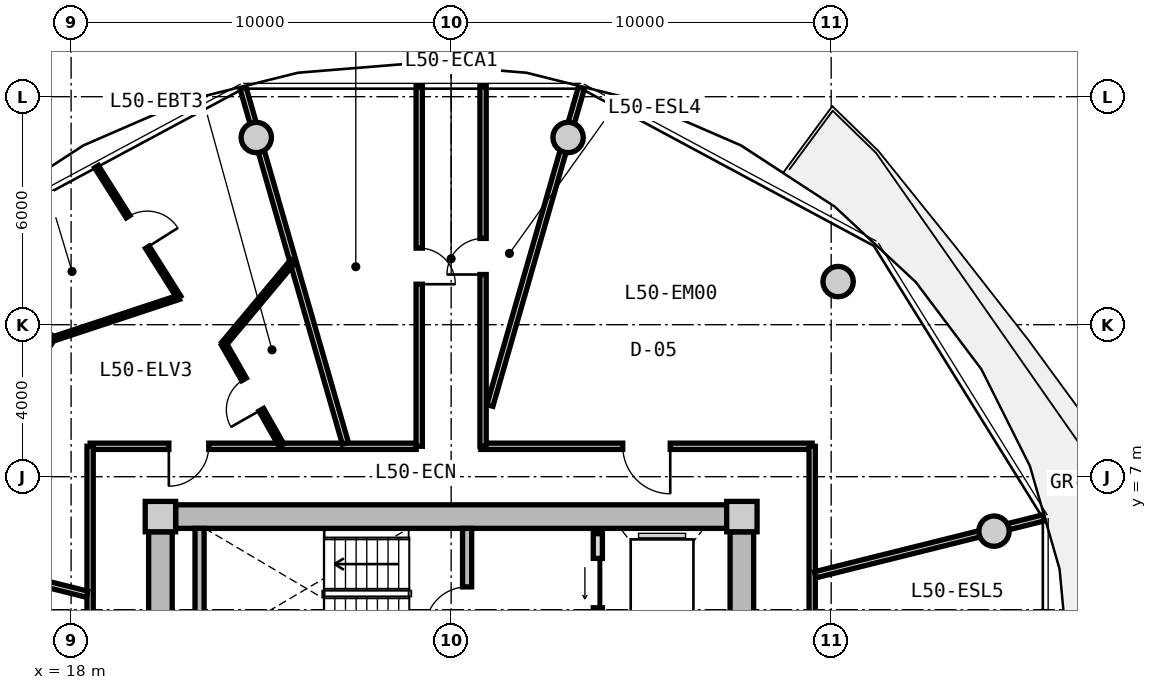
"""IFC4 building model, lengths in metres.
Left out: names, types, materials, properties, quantities, classifications, styles, units other than length and angle.
Written with IfcOpenShell. Run it as: python <this file> out.ifc"""

import sys

from ifc_helpers import new_model, si_unit, direction, frame, frame_2d, origin, origin_2d, place, context, subcontext, project, spatial, rectangle, circle, extrude, source, transform, mapped, element, fill, save


model = new_model("IFC4")
c1 = context("Model", 3, precision=1e-05, world=origin(), true_north=direction((0.0, 1.0)))
c2 = subcontext(c1, "Body", "Model", "MODEL_VIEW")
j1 = project(units=[si_unit("LENGTHUNIT", "METRE"), si_unit("PLANEANGLEUNIT", "RADIAN")], contexts=[c1])
p1 = place(None, origin())
s1 = spatial("IfcSite", under=j1, at=p1, CompositionType="ELEMENT")
p2 = place(p1, origin())
s2 = spatial("IfcBuilding", under=s1, at=p2, CompositionType="ELEMENT")
p3 = place(p2, frame((0.0, 0.0, 161.75)))
s3 = spatial("IfcBuildingStorey", under=s2, at=p3, CompositionType="ELEMENT", Elevation=161.75)
m1 = source(origin(), c2, "Body", "SweptSolid", [
    extrude(rectangle(XDim=0.8, YDim=0.8, at=origin_2d()), origin(), (0.0, 0.0, 1.0), 3.05),
])
for number, where, z_axis, x_axis in (
    (1, (35.65, 5.95, 0.0), (0.0, 0.0, 1.0), (1.0, 0.0, 0.0)),
    (2, (20.35, 5.95, 0.0), (0.0, 0.0, 1.0), (1.0, 0.0, 0.0)),
):
    element("IfcColumn", number, at=place(p3, frame(where, z_axis=z_axis, x_axis=x_axis)), inside=s3, PredefinedType="COLUMN", context=c2, shape_type="MappedRepresentation", body=[
        mapped(m1, transform((0.0, 0.0, 0.0), x_axis=(1.0, 0.0, 0.0), y_axis=(0.0, 1.0, 0.0), z_axis=(0.0, 0.0, 1.0), scale=1.0)),
    ])
m2 = source(origin(), c2, "Body", "SweptSolid", [
    extrude(rectangle(XDim=14.5, YDim=0.62, at=frame_2d((7.25, 0.0))), origin(), (0.0, 0.0, 1.0), 2.81),
])
p4 = place(p3, frame((20.75, 5.95, 0.0), z_axis=(0.0, 0.0, 1.0), x_axis=(1.0, 0.0, 0.0)))
e3 = element("IfcWall", 3, at=p4, inside=s3, PredefinedType="SHEAR", context=c2, shape_type="MappedRepresentation", body=[
    mapped(m2, transform((0.0, 0.0, 0.0), x_axis=(1.0, 0.0, 0.0), y_axis=(0.0, 1.0, 0.0), z_axis=(0.0, 0.0, 1.0), scale=1.0)),
])
m3 = source(origin(), c2, "Body", "SweptSolid", [
    extrude(rectangle(XDim=11.1, YDim=0.62, at=frame_2d((5.55, 0.0))), origin(), (0.0, 0.0, 1.0), 2.81),
])
p5 = place(p3, frame((20.35, -5.55, 0.0), z_axis=(0.0, 0.0, 1.0), x_axis=(0.0, 1.0, 0.0)))
e4 = element("IfcWall", 4, at=p5, inside=s3, PredefinedType="SHEAR", context=c2, shape_type="MappedRepresentation", body=[
    mapped(m3, transform((0.0, 0.0, 0.0), x_axis=(1.0, 0.0, 0.0), y_axis=(0.0, 1.0, 0.0), z_axis=(0.0, 0.0, 1.0), scale=1.0)),
])
p6 = place(p5, frame((3.8, 0.0, 0.0)))
e5 = element("IfcOpeningElement", 5, at=p6, cuts=e4, PredefinedType="OPENING", context=c2, shape_type="SweptSolid", body=[
    extrude(rectangle(XDim=1.2, YDim=2.15, at=frame_2d((0.6, 1.075))), frame((0.0, 0.32, 0.0), z_axis=(0.0, -1.0, 0.0), x_axis=(1.0, 0.0, 0.0)), (0.0, 0.0, 1.0), 0.64),
])
p7 = place(p3, frame((35.65, 5.55, 0.0), z_axis=(0.0, 0.0, 1.0), x_axis=(0.0, -1.0, 0.0)))
e6 = element("IfcWall", 6, at=p7, inside=s3, PredefinedType="SHEAR", context=c2, shape_type="MappedRepresentation", body=[
    mapped(m3, transform((0.0, 0.0, 0.0), x_axis=(1.0, 0.0, 0.0), y_axis=(0.0, 1.0, 0.0), z_axis=(0.0, 0.0, 1.0), scale=1.0)),
])
p8 = place(p7, frame((5.65, 0.0, 0.0)))
e7 = element("IfcOpeningElement", 7, at=p8, cuts=e6, PredefinedType="OPENING", context=c2, shape_type="SweptSolid", body=[
    extrude(rectangle(XDim=1.2, YDim=2.15, at=frame_2d((0.6, 1.075))), frame((0.0, 0.32, 0.0), z_axis=(0.0, -1.0, 0.0), x_axis=(1.0, 0.0, 0.0)), (0.0, 0.0, 1.0), 0.64),
])
m4 = source(origin(), c2, "Body", "SweptSolid", [
    extrude(circle(Radius=0.4, at=origin_2d()), origin(), (0.0, 0.0, 1.0), 3.05),
])
for number, where, z_axis, x_axis in (
    (8, (42.285, 5.567, 0.0), (0.0, 0.0, 1.0), (1.0, 0.0, 0.0)),
    (9, (38.183, 12.135, 0.0), (0.0, 0.0, 1.0), (1.0, 0.0, 0.0)),
    (10, (31.077, 15.926, 0.0), (0.0, 0.0, 1.0), (1.0, 0.0, 0.0)),
    (11, (22.873, 15.926, 0.0), (0.0, 0.0, 1.0), (1.0, 0.0, 0.0)),
):
    element("IfcColumn", number, at=place(p3, frame(where, z_axis=z_axis, x_axis=x_axis)), inside=s3, PredefinedType="COLUMN", context=c2, shape_type="MappedRepresentation", body=[
        mapped(m4, transform((0.0, 0.0, 0.0), x_axis=(1.0, 0.0, 0.0), y_axis=(0.0, 1.0, 0.0), z_axis=(0.0, 0.0, 1.0), scale=1.0)),
    ])
m5 = source(origin(), c2, "Body", "SweptSolid", [
    extrude(rectangle(XDim=3.19, YDim=0.24, at=frame_2d((1.595, 0.0))), origin(), (0.0, 0.0, 1.0), 2.81),
])
p9 = place(p3, frame((21.38, 2.45, 0.0), z_axis=(0.0, 0.0, 1.0), x_axis=(0.0, 1.0, 0.0)))
e12 = element("IfcWall", 12, at=p9, inside=s3, PredefinedType="PARTITIONING", context=c2, shape_type="MappedRepresentation", body=[
    mapped(m5, transform((0.0, 0.0, 0.0), x_axis=(1.0, 0.0, 0.0), y_axis=(0.0, 1.0, 0.0), z_axis=(0.0, 0.0, 1.0), scale=1.0)),
])
p10 = place(p3, frame((28.42, 2.45, 0.0), z_axis=(0.0, 0.0, 1.0), x_axis=(0.0, 1.0, 0.0)))
e13 = element("IfcWall", 13, at=p10, inside=s3, PredefinedType="PARTITIONING", context=c2, shape_type="MappedRepresentation", body=[
    mapped(m5, transform((0.0, 0.0, 0.0), x_axis=(1.0, 0.0, 0.0), y_axis=(0.0, 1.0, 0.0), z_axis=(0.0, 0.0, 1.0), scale=1.0)),
])
p11 = place(p10, frame((0.55, 0.0, 0.0)))
e14 = element("IfcOpeningElement", 14, at=p11, cuts=e13, PredefinedType="OPENING", context=c2, shape_type="SweptSolid", body=[
    extrude(rectangle(XDim=1.1, YDim=2.15, at=frame_2d((0.55, 1.075))), frame((0.0, 0.13, 0.0), z_axis=(0.0, -1.0, 0.0), x_axis=(1.0, 0.0, 0.0)), (0.0, 0.0, 1.0), 0.26),
])
m6 = source(origin(), c2, "Body", "SweptSolid", [
    extrude(rectangle(XDim=5.0, YDim=0.24, at=frame_2d((2.5, 0.0))), origin(), (0.0, 0.0, 1.0), 2.795),
])
p12 = place(p3, frame((31.86, 0.5, 0.0), z_axis=(0.0, 0.0, 1.0), x_axis=(0.0, 1.0, 0.0)))
e15 = element("IfcWall", 15, at=p12, inside=s3, PredefinedType="PARTITIONING", context=c2, shape_type="MappedRepresentation", body=[
    mapped(m6, transform((0.0, 0.0, 0.0), x_axis=(1.0, 0.0, 0.0), y_axis=(0.0, 1.0, 0.0), z_axis=(0.0, 0.0, 1.0), scale=1.0)),
])
p13 = place(p12, frame((3.05, 0.0, 0.0)))
e16 = element("IfcOpeningElement", 16, at=p13, cuts=e15, PredefinedType="OPENING", context=c2, shape_type="SweptSolid", body=[
    extrude(rectangle(XDim=1.3, YDim=2.2, at=frame_2d((0.65, 1.1))), frame((0.0, 0.13, 0.0), z_axis=(0.0, -1.0, 0.0), x_axis=(1.0, 0.0, 0.0)), (0.0, 0.0, 1.0), 0.26),
])
p14 = place(p12, frame((0.55, 0.0, 0.0)))
e17 = element("IfcOpeningElement", 17, at=p14, cuts=e15, PredefinedType="OPENING", context=c2, shape_type="SweptSolid", body=[
    extrude(rectangle(XDim=1.3, YDim=2.2, at=frame_2d((0.65, 1.1))), frame((0.0, 0.13, 0.0), z_axis=(0.0, -1.0, 0.0), x_axis=(1.0, 0.0, 0.0)), (0.0, 0.0, 1.0), 0.26),
])
m7 = source(origin(), c2, "Body", "SweptSolid", [
    extrude(rectangle(XDim=8.58, YDim=0.165, at=frame_2d((4.29, 0.0))), origin(), (0.0, 0.0, 1.0), 2.795),
])
p15 = place(p3, frame((18.5, 7.8, 0.0), z_axis=(0.0, 0.0, 1.0), x_axis=(1.0, 0.0, 0.0)))
e18 = element("IfcWall", 18, at=p15, inside=s3, PredefinedType="PARTITIONING", context=c2, shape_type="MappedRepresentation", body=[
    mapped(m7, transform((0.0, 0.0, 0.0), x_axis=(1.0, 0.0, 0.0), y_axis=(0.0, 1.0, 0.0), z_axis=(0.0, 0.0, 1.0), scale=1.0)),
])
p16 = place(p15, frame((2.072, 0.0, 0.0)))
e19 = element("IfcOpeningElement", 19, at=p16, cuts=e18, PredefinedType="OPENING", context=c2, shape_type="SweptSolid", body=[
    extrude(rectangle(XDim=1.05, YDim=2.15, at=frame_2d((0.525, 1.075))), frame((0.0, 0.093, 0.0), z_axis=(0.0, -1.0, 0.0), x_axis=(1.0, 0.0, 0.0)), (0.0, 0.0, 1.0), 0.185),
])
m8 = source(origin(), c2, "Body", "SweptSolid", [
    extrude(rectangle(XDim=8.719, YDim=0.165, at=frame_2d((4.36, 0.0))), origin(), (0.0, 0.0, 1.0), 2.795),
])
p17 = place(p3, frame((28.781, 7.8, 0.0), z_axis=(0.0, 0.0, 1.0), x_axis=(1.0, 0.0, 0.0)))
e20 = element("IfcWall", 20, at=p17, inside=s3, PredefinedType="PARTITIONING", context=c2, shape_type="MappedRepresentation", body=[
    mapped(m8, transform((0.0, 0.0, 0.0), x_axis=(1.0, 0.0, 0.0), y_axis=(0.0, 1.0, 0.0), z_axis=(0.0, 0.0, 1.0), scale=1.0)),
])
p18 = place(p17, frame((3.735, 0.0, 0.0)))
e21 = element("IfcOpeningElement", 21, at=p18, cuts=e20, PredefinedType="OPENING", context=c2, shape_type="SweptSolid", body=[
    extrude(rectangle(XDim=1.25, YDim=2.2, at=frame_2d((0.625, 1.1))), frame((0.0, 0.093, 0.0), z_axis=(0.0, -1.0, 0.0), x_axis=(1.0, 0.0, 0.0)), (0.0, 0.0, 1.0), 0.185),
])
m9 = source(origin(), c2, "Body", "SweptSolid", [
    extrude(rectangle(XDim=6.88, YDim=0.165, at=frame_2d((3.44, 0.0))), origin(), (0.0, 0.0, 1.0), 2.795),
])
for number, where, z_axis, x_axis in (
    (22, (18.5, 0.92, 0.0), (0.0, 0.0, 1.0), (0.0, 1.0, 0.0)),
    (23, (37.5, 7.8, 0.0), (0.0, 0.0, 1.0), (0.0, -1.0, 0.0)),
):
    element("IfcWall", number, at=place(p3, frame(where, z_axis=z_axis, x_axis=x_axis)), inside=s3, PredefinedType="PARTITIONING", context=c2, shape_type="MappedRepresentation", body=[
        mapped(m9, transform((0.0, 0.0, 0.0), x_axis=(1.0, 0.0, 0.0), y_axis=(0.0, 1.0, 0.0), z_axis=(0.0, 0.0, 1.0), scale=1.0)),
    ])
m10 = source(origin(), c2, "Body", "SweptSolid", [
    extrude(rectangle(XDim=8.695, YDim=0.165, at=frame_2d((4.348, 0.0))), origin(), (0.0, 0.0, 1.0), 2.345),
])
p19 = place(p3, frame((29.02, 8.875, 0.0), z_axis=(0.0, 0.0, 1.0), x_axis=(0.276797231892, 0.960928349263, 0.0)))
e24 = element("IfcWall", 24, at=p19, inside=s3, PredefinedType="PARTITIONING", context=c2, shape_type="MappedRepresentation", body=[
    mapped(m10, transform((0.0, 0.0, 0.0), x_axis=(1.0, 0.0, 0.0), y_axis=(0.0, 1.0, 0.0), z_axis=(0.0, 0.0, 1.0), scale=1.0)),
])
m11 = source(origin(), c2, "Body", "SweptSolid", [
    extrude(rectangle(XDim=9.73, YDim=0.165, at=frame_2d((4.865, 0.0))), origin(), (0.0, 0.0, 1.0), 2.345),
])
p20 = place(p3, frame((25.217, 7.88, 0.0), z_axis=(0.0, 0.0, 1.0), x_axis=(-0.27679492614, 0.960929013436, 0.0)))
e25 = element("IfcWall", 25, at=p20, inside=s3, PredefinedType="PARTITIONING", context=c2, shape_type="MappedRepresentation", body=[
    mapped(m11, transform((0.0, 0.0, 0.0), x_axis=(1.0, 0.0, 0.0), y_axis=(0.0, 1.0, 0.0), z_axis=(0.0, 0.0, 1.0), scale=1.0)),
])
m12 = source(origin(), c2, "Body", "SweptSolid", [
    extrude(rectangle(XDim=8.305, YDim=0.165, at=frame_2d((4.153, 0.0))), origin(), (0.0, 0.0, 1.0), 2.345),
])
p21 = place(p3, frame((18.42, 3.908, 0.0), z_axis=(0.0, 0.0, 1.0), x_axis=(-0.970309994378, 0.241864662175, 0.0)))
e26 = element("IfcWall", 26, at=p21, inside=s3, PredefinedType="PARTITIONING", context=c2, shape_type="MappedRepresentation", body=[
    mapped(m12, transform((0.0, 0.0, 0.0), x_axis=(1.0, 0.0, 0.0), y_axis=(0.0, 1.0, 0.0), z_axis=(0.0, 0.0, 1.0), scale=1.0)),
])
m13 = source(origin(), c2, "Body", "SweptSolid", [
    extrude(rectangle(XDim=6.193, YDim=0.165, at=frame_2d((3.096, 0.0))), origin(), (0.0, 0.0, 1.0), 2.345),
])
p22 = place(p3, frame((37.58, 4.419, 0.0), z_axis=(0.0, 0.0, 1.0), x_axis=(0.970309243466, 0.241867674657, 0.0)))
e27 = element("IfcWall", 27, at=p22, inside=s3, PredefinedType="PARTITIONING", context=c2, shape_type="MappedRepresentation", body=[
    mapped(m13, transform((0.0, 0.0, 0.0), x_axis=(1.0, 0.0, 0.0), y_axis=(0.0, 1.0, 0.0), z_axis=(0.0, 0.0, 1.0), scale=1.0)),
])
m14 = source(origin(), c2, "Body", "SweptSolid", [
    extrude(rectangle(XDim=9.48, YDim=0.165, at=frame_2d((4.74, 0.0))), origin(), (0.0, 0.0, 1.0), 2.795),
])
p23 = place(p3, frame((27.16, 7.8, 0.0), z_axis=(0.0, 0.0, 1.0), x_axis=(0.0, 1.0, 0.0)))
e28 = element("IfcWall", 28, at=p23, inside=s3, PredefinedType="PARTITIONING", context=c2, shape_type="MappedRepresentation", body=[
    mapped(m14, transform((0.0, 0.0, 0.0), x_axis=(1.0, 0.0, 0.0), y_axis=(0.0, 1.0, 0.0), z_axis=(0.0, 0.0, 1.0), scale=1.0)),
])
p24 = place(p23, frame((4.265, 0.0, 0.0)))
e29 = element("IfcOpeningElement", 29, at=p24, cuts=e28, PredefinedType="OPENING", context=c2, shape_type="SweptSolid", body=[
    extrude(rectangle(XDim=0.95, YDim=2.1, at=frame_2d((0.475, 1.05))), frame((0.0, 0.093, 0.0), z_axis=(0.0, -1.0, 0.0), x_axis=(1.0, 0.0, 0.0)), (0.0, 0.0, 1.0), 0.185),
])
p25 = place(p3, frame((28.84, 17.28, 0.0), z_axis=(0.0, 0.0, 1.0), x_axis=(0.0, -1.0, 0.0)))
e30 = element("IfcWall", 30, at=p25, inside=s3, PredefinedType="PARTITIONING", context=c2, shape_type="MappedRepresentation", body=[
    mapped(m14, transform((0.0, 0.0, 0.0), x_axis=(1.0, 0.0, 0.0), y_axis=(0.0, 1.0, 0.0), z_axis=(0.0, 0.0, 1.0), scale=1.0)),
])
p26 = place(p25, frame((4.01, 0.0, 0.0)))
e31 = element("IfcOpeningElement", 31, at=p26, cuts=e30, PredefinedType="OPENING", context=c2, shape_type="SweptSolid", body=[
    extrude(rectangle(XDim=0.95, YDim=2.1, at=frame_2d((0.475, 1.05))), frame((0.0, 0.093, 0.0), z_axis=(0.0, -1.0, 0.0), x_axis=(1.0, 0.0, 0.0)), (0.0, 0.0, 1.0), 0.185),
])
m15 = source(origin(), c2, "Body", "SweptSolid", [
    extrude(rectangle(XDim=6.654, YDim=0.115, at=frame_2d((3.327, 0.0))), origin(), (0.0, 0.0, 1.0), 2.795),
])
p27 = place(p3, frame((17.509, 10.632, 0.0), z_axis=(0.0, 0.0, 1.0), x_axis=(-0.53923796816, -0.842153438332, 0.0)))
e32 = element("IfcWall", 32, at=p27, inside=s3, PredefinedType="PARTITIONING", context=c2, shape_type="MappedRepresentation", body=[
    mapped(m15, transform((0.0, 0.0, 0.0), x_axis=(1.0, 0.0, 0.0), y_axis=(0.0, 1.0, 0.0), z_axis=(0.0, 0.0, 1.0), scale=1.0)),
])
p28 = place(p27, frame((2.852, 0.0, 0.0)))
e33 = element("IfcOpeningElement", 33, at=p28, cuts=e32, PredefinedType="OPENING", context=c2, shape_type="SweptSolid", body=[
    extrude(rectangle(XDim=0.95, YDim=2.1, at=frame_2d((0.475, 1.05))), frame((0.0, 0.067, 0.0), z_axis=(0.0, -1.0, 0.0), x_axis=(1.0, 0.0, 0.0)), (0.0, 0.0, 1.0), 0.135),
])
m16 = source(origin(), c2, "Body", "SweptSolid", [
    extrude(rectangle(XDim=3.648, YDim=0.115, at=frame_2d((1.824, 0.0))), origin(), (0.0, 0.0, 1.0), 2.345),
])
p29 = place(p3, frame((17.509, 10.632, 0.0), z_axis=(0.0, 0.0, 1.0), x_axis=(-0.739109697605, 0.67358507622, 0.0)))
e34 = element("IfcWall", 34, at=p29, inside=s3, PredefinedType="PARTITIONING", context=c2, shape_type="MappedRepresentation", body=[
    mapped(m16, transform((0.0, 0.0, 0.0), x_axis=(1.0, 0.0, 0.0), y_axis=(0.0, 1.0, 0.0), z_axis=(0.0, 0.0, 1.0), scale=1.0)),
])
m17 = source(origin(), c2, "Body", "SweptSolid", [
    extrude(rectangle(XDim=3.064, YDim=0.14, at=frame_2d((1.532, 0.0))), origin(), (0.0, 0.0, 1.0), 2.795),
])
p30 = place(p3, frame((23.534, 7.83, 0.0), z_axis=(0.0, 0.0, 1.0), x_axis=(-0.494103864861, 0.869402881712, 0.0)))
e35 = element("IfcWall", 35, at=p30, inside=s3, PredefinedType="PARTITIONING", context=c2, shape_type="MappedRepresentation", body=[
    mapped(m17, transform((0.0, 0.0, 0.0), x_axis=(1.0, 0.0, 0.0), y_axis=(0.0, 1.0, 0.0), z_axis=(0.0, 0.0, 1.0), scale=1.0)),
])
p31 = place(p30, frame((1.072, 0.0, 0.0)))
e36 = element("IfcOpeningElement", 36, at=p31, cuts=e35, PredefinedType="OPENING", context=c2, shape_type="SweptSolid", body=[
    extrude(rectangle(XDim=0.92, YDim=2.1, at=frame_2d((0.46, 1.05))), frame((0.0, 0.08, 0.0), z_axis=(0.0, -1.0, 0.0), x_axis=(1.0, 0.0, 0.0)), (0.0, 0.0, 1.0), 0.16),
])
m18 = source(origin(), c2, "Body", "SweptSolid", [
    extrude(rectangle(XDim=2.833, YDim=0.14, at=frame_2d((1.417, 0.0))), origin(), (0.0, 0.0, 1.0), 2.795),
])
p32 = place(p3, frame((22.02, 10.494, 0.0), z_axis=(0.0, 0.0, 1.0), x_axis=(0.64098072766, 0.767556972979, 0.0)))
e37 = element("IfcWall", 37, at=p32, inside=s3, PredefinedType="PARTITIONING", context=c2, shape_type="MappedRepresentation", body=[
    mapped(m18, transform((0.0, 0.0, 0.0), x_axis=(1.0, 0.0, 0.0), y_axis=(0.0, 1.0, 0.0), z_axis=(0.0, 0.0, 1.0), scale=1.0)),
])
m19 = source(origin(), c2, "Body", "SweptSolid", [
    extrude(rectangle(XDim=4.066, YDim=0.115, at=frame_2d((2.033, 0.0))), origin(), (0.0, 0.0, 1.0), 2.795),
])
p33 = place(p3, frame((20.838, 11.721, 0.0), z_axis=(0.0, 0.0, 1.0), x_axis=(-0.533669868169, 0.8456928945, 0.0)))
e38 = element("IfcWall", 38, at=p33, inside=s3, PredefinedType="PARTITIONING", context=c2, shape_type="MappedRepresentation", body=[
    mapped(m19, transform((0.0, 0.0, 0.0), x_axis=(1.0, 0.0, 0.0), y_axis=(0.0, 1.0, 0.0), z_axis=(0.0, 0.0, 1.0), scale=1.0)),
])
p34 = place(p33, frame((1.558, 0.0, 0.0)))
e39 = element("IfcOpeningElement", 39, at=p34, cuts=e38, PredefinedType="OPENING", context=c2, shape_type="SweptSolid", body=[
    extrude(rectangle(XDim=0.95, YDim=2.1, at=frame_2d((0.475, 1.05))), frame((0.0, 0.067, 0.0), z_axis=(0.0, -1.0, 0.0), x_axis=(1.0, 0.0, 0.0)), (0.0, 0.0, 1.0), 0.135),
])
m20 = source(origin(), c2, "Body", "SweptSolid", [
    extrude(rectangle(XDim=3.496, YDim=0.115, at=frame_2d((1.748, 0.0))), origin(), (0.0, 0.0, 1.0), 2.795),
])
p35 = place(p3, frame((20.838, 11.721, 0.0), z_axis=(0.0, 0.0, 1.0), x_axis=(-0.949420852529, -0.314006440672, 0.0)))
e40 = element("IfcWall", 40, at=p35, inside=s3, PredefinedType="PARTITIONING", context=c2, shape_type="MappedRepresentation", body=[
    mapped(m20, transform((0.0, 0.0, 0.0), x_axis=(1.0, 0.0, 0.0), y_axis=(0.0, 1.0, 0.0), z_axis=(0.0, 0.0, 1.0), scale=1.0)),
])
m21 = source(origin(), c2, "Body", "SweptSolid", [
    extrude(rectangle(XDim=1.1, YDim=2.15, at=frame_2d((0.55, 1.075))), frame((0.0, 0.025, 0.0), z_axis=(0.0, -1.0, 0.0), x_axis=(1.0, 0.0, 0.0)), (0.0, 0.0, 1.0), 0.05),
])
p36 = place(p11, origin())
e41 = element("IfcDoor", 41, at=p36, inside=s3, OperationType="SINGLE_SWING_LEFT", PredefinedType="DOOR", context=c2, shape_type="MappedRepresentation", body=[
    mapped(m21, transform((0.0, 0.0, 0.0), x_axis=(1.0, 0.0, 0.0), y_axis=(0.0, 1.0, 0.0), z_axis=(0.0, 0.0, 1.0), scale=1.0)),
])
fill(e14, e41)
m22 = source(origin(), c2, "Body", "SweptSolid", [
    extrude(rectangle(XDim=1.3, YDim=2.2, at=frame_2d((0.65, 1.1))), frame((0.0, 0.025, 0.0), z_axis=(0.0, -1.0, 0.0), x_axis=(1.0, 0.0, 0.0)), (0.0, 0.0, 1.0), 0.05),
])
p37 = place(p13, origin())
e42 = element("IfcDoor", 42, at=p37, inside=s3, OperationType="SLIDING_TO_LEFT", PredefinedType="DOOR", context=c2, shape_type="MappedRepresentation", body=[
    mapped(m22, transform((0.0, 0.0, 0.0), x_axis=(1.0, 0.0, 0.0), y_axis=(0.0, 1.0, 0.0), z_axis=(0.0, 0.0, 1.0), scale=1.0)),
])
fill(e16, e42)
m23 = source(origin(), c2, "Body", "SweptSolid", [
    extrude(rectangle(XDim=0.95, YDim=2.1, at=frame_2d((0.475, 1.05))), frame((0.0, 0.025, 0.0), z_axis=(0.0, -1.0, 0.0), x_axis=(1.0, 0.0, 0.0)), (0.0, 0.0, 1.0), 0.05),
])
p38 = place(p24, frame((0.95, 0.0, 0.0), z_axis=(0.0, 0.0, 1.0), x_axis=(-1.0, 0.0, 0.0)))
e43 = element("IfcDoor", 43, at=p38, inside=s3, OperationType="SINGLE_SWING_RIGHT", PredefinedType="DOOR", context=c2, shape_type="MappedRepresentation", body=[
    mapped(m23, transform((0.0, 0.0, 0.0), x_axis=(1.0, 0.0, 0.0), y_axis=(0.0, 1.0, 0.0), z_axis=(0.0, 0.0, 1.0), scale=1.0)),
])
fill(e29, e43)
p39 = place(p26, frame((0.95, 0.0, 0.0), z_axis=(0.0, 0.0, 1.0), x_axis=(-1.0, 0.0, 0.0)))
e44 = element("IfcDoor", 44, at=p39, inside=s3, OperationType="SINGLE_SWING_LEFT", PredefinedType="DOOR", context=c2, shape_type="MappedRepresentation", body=[
    mapped(m23, transform((0.0, 0.0, 0.0), x_axis=(1.0, 0.0, 0.0), y_axis=(0.0, 1.0, 0.0), z_axis=(0.0, 0.0, 1.0), scale=1.0)),
])
fill(e31, e44)
m24 = source(origin(), c2, "Body", "SweptSolid", [
    extrude(rectangle(XDim=1.25, YDim=2.2, at=frame_2d((0.625, 1.1))), frame((0.0, 0.025, 0.0), z_axis=(0.0, -1.0, 0.0), x_axis=(1.0, 0.0, 0.0)), (0.0, 0.0, 1.0), 0.05),
])
p40 = place(p18, frame((1.25, 0.0, 0.0), z_axis=(0.0, 0.0, 1.0), x_axis=(-1.0, 0.0, 0.0)))
e45 = element("IfcDoor", 45, at=p40, inside=s3, OperationType="SINGLE_SWING_LEFT", PredefinedType="DOOR", context=c2, shape_type="MappedRepresentation", body=[
    mapped(m24, transform((0.0, 0.0, 0.0), x_axis=(1.0, 0.0, 0.0), y_axis=(0.0, 1.0, 0.0), z_axis=(0.0, 0.0, 1.0), scale=1.0)),
])
fill(e21, e45)
m25 = source(origin(), c2, "Body", "SweptSolid", [
    extrude(rectangle(XDim=1.05, YDim=2.15, at=frame_2d((0.525, 1.075))), frame((0.0, 0.025, 0.0), z_axis=(0.0, -1.0, 0.0), x_axis=(1.0, 0.0, 0.0)), (0.0, 0.0, 1.0), 0.05),
])
p41 = place(p16, frame((1.05, 0.0, 0.0), z_axis=(0.0, 0.0, 1.0), x_axis=(-1.0, 0.0, 0.0)))
e46 = element("IfcDoor", 46, at=p41, inside=s3, OperationType="SINGLE_SWING_RIGHT", PredefinedType="DOOR", context=c2, shape_type="MappedRepresentation", body=[
    mapped(m25, transform((0.0, 0.0, 0.0), x_axis=(1.0, 0.0, 0.0), y_axis=(0.0, 1.0, 0.0), z_axis=(0.0, 0.0, 1.0), scale=1.0)),
])
fill(e19, e46)
m26 = source(origin(), c2, "Body", "SweptSolid", [
    extrude(rectangle(XDim=0.92, YDim=2.1, at=frame_2d((0.46, 1.05))), frame((0.0, 0.025, 0.0), z_axis=(0.0, -1.0, 0.0), x_axis=(1.0, 0.0, 0.0)), (0.0, 0.0, 1.0), 0.05),
])
p42 = place(p31, origin())
e47 = element("IfcDoor", 47, at=p42, inside=s3, OperationType="SINGLE_SWING_LEFT", PredefinedType="DOOR", context=c2, shape_type="MappedRepresentation", body=[
    mapped(m26, transform((0.0, 0.0, 0.0), x_axis=(1.0, 0.0, 0.0), y_axis=(0.0, 1.0, 0.0), z_axis=(0.0, 0.0, 1.0), scale=1.0)),
])
fill(e36, e47)
p43 = place(p34, frame((0.95, 0.0, 0.0), z_axis=(0.0, 0.0, 1.0), x_axis=(-1.0, 0.0, 0.0)))
e48 = element("IfcDoor", 48, at=p43, inside=s3, OperationType="SINGLE_SWING_RIGHT", PredefinedType="DOOR", context=c2, shape_type="MappedRepresentation", body=[
    mapped(m23, transform((0.0, 0.0, 0.0), x_axis=(1.0, 0.0, 0.0), y_axis=(0.0, 1.0, 0.0), z_axis=(0.0, 0.0, 1.0), scale=1.0)),
])
fill(e39, e48)
save(model, sys.argv[1])
